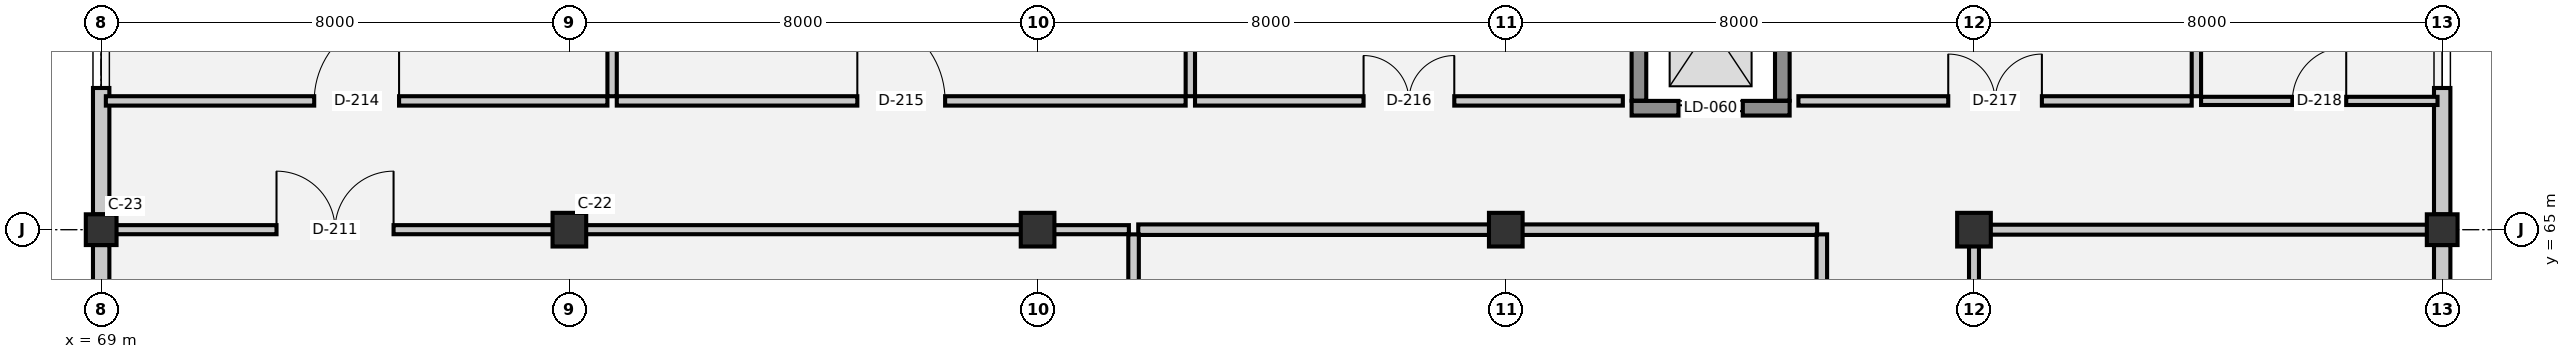
"""IFC4 building model, lengths in metres.
Left out: names, types, materials, properties, quantities, classifications, styles, units other than length and angle.
Written with IfcOpenShell. Run it as: python <this file> out.ifc"""

import sys

from ifc_helpers import new_model, si_unit, direction, frame, frame_2d, origin, origin_2d, place, context, subcontext, project, spatial, rectangle, extrude, element, fill, save


model = new_model("IFC4")
c1 = context("Model", 3, precision=1e-05, world=origin(), true_north=direction((0.0, 1.0)))
c2 = subcontext(c1, "Body", "Model", "MODEL_VIEW")
j1 = project(units=[si_unit("LENGTHUNIT", "METRE"), si_unit("PLANEANGLEUNIT", "RADIAN")], contexts=[c1])
p1 = place(None, origin())
s1 = spatial("IfcSite", under=j1, at=p1, CompositionType="ELEMENT")
p2 = place(p1, origin())
s2 = spatial("IfcBuilding", under=s1, at=p2, CompositionType="ELEMENT")
p3 = place(p2, frame((0.0, 0.0, 37.05)))
s3 = spatial("IfcBuildingStorey", under=s2, at=p3, CompositionType="ELEMENT", Elevation=37.05)
p4 = place(p3, frame((69.0, 65.0, 0.0), z_axis=(0.0, 0.0, 1.0), x_axis=(1.0, 0.0, 0.0)))
e1 = element("IfcColumn", 1, at=p4, inside=s3, PredefinedType="COLUMN", context=c2, shape_type="SweptSolid", body=[
    extrude(rectangle(XDim=0.525, YDim=0.525, at=origin_2d()), origin(), (0.0, 0.0, 1.0), 3.75),
])
for number, where, z_axis, x_axis in (
    (2, (77.0, 65.0, 0.0), (0.0, 0.0, 1.0), (1.0, 0.0, 0.0)),
    (3, (85.0, 65.0, 0.0), (0.0, 0.0, 1.0), (1.0, 0.0, 0.0)),
    (4, (93.0, 65.0, 0.0), (0.0, 0.0, 1.0), (1.0, 0.0, 0.0)),
    (5, (101.0, 65.0, 0.0), (0.0, 0.0, 1.0), (1.0, 0.0, 0.0)),
):
    element("IfcColumn", number, at=place(p3, frame(where, z_axis=z_axis, x_axis=x_axis)), inside=s3, PredefinedType="COLUMN", context=c2, shape_type="SweptSolid", body=[
        extrude(rectangle(XDim=0.575, YDim=0.575, at=origin_2d()), origin(), (0.0, 0.0, 1.0), 3.75),
    ])
p5 = place(p3, frame((109.0, 65.0, 0.0), z_axis=(0.0, 0.0, 1.0), x_axis=(1.0, 0.0, 0.0)))
e6 = element("IfcColumn", 6, at=p5, inside=s3, PredefinedType="COLUMN", context=c2, shape_type="SweptSolid", body=[
    extrude(rectangle(XDim=0.525, YDim=0.525, at=origin_2d()), origin(), (0.0, 0.0, 1.0), 3.75),
])
p6 = place(p3, frame((69.0, 51.262, 0.0), z_axis=(0.0, 0.0, 1.0), x_axis=(0.0, 1.0, 0.0)))
e7 = element("IfcWall", 7, at=p6, inside=s3, PredefinedType="SOLIDWALL", context=c2, shape_type="SweptSolid", body=[
    extrude(rectangle(XDim=13.475, YDim=0.28, at=frame_2d((6.738, 0.0))), origin(), (0.0, 0.0, 1.0), 2.6),
])
p7 = place(p6, frame((5.438, 0.0, 1.0)))
e8 = element("IfcOpeningElement", 8, at=p7, cuts=e7, PredefinedType="OPENING", context=c2, shape_type="SweptSolid", body=[
    extrude(rectangle(XDim=2.6, YDim=1.1, at=frame_2d((1.3, 0.55))), frame((0.0, 0.15, 0.0), z_axis=(0.0, -1.0, 0.0), x_axis=(1.0, 0.0, 0.0)), (0.0, 0.0, 1.0), 0.3),
])
p8 = place(p3, frame((69.0, 65.262, 0.0), z_axis=(0.0, 0.0, 1.0), x_axis=(0.0, 1.0, 0.0)))
e9 = element("IfcWall", 9, at=p8, inside=s3, PredefinedType="SOLIDWALL", context=c2, shape_type="SweptSolid", body=[
    extrude(rectangle(XDim=6.475, YDim=0.28, at=frame_2d((3.238, 0.0))), origin(), (0.0, 0.0, 1.0), 2.6),
])
p9 = place(p8, frame((2.158, 0.0, 1.0)))
e10 = element("IfcOpeningElement", 10, at=p9, cuts=e9, PredefinedType="OPENING", context=c2, shape_type="SweptSolid", body=[
    extrude(rectangle(XDim=2.6, YDim=1.1, at=frame_2d((1.3, 0.55))), frame((0.0, 0.15, 0.0), z_axis=(0.0, -1.0, 0.0), x_axis=(1.0, 0.0, 0.0)), (0.0, 0.0, 1.0), 0.3),
])
p10 = place(p3, frame((109.0, 71.738, 0.0), z_axis=(0.0, 0.0, 1.0), x_axis=(0.0, -1.0, 0.0)))
e11 = element("IfcWall", 11, at=p10, inside=s3, PredefinedType="SOLIDWALL", context=c2, shape_type="SweptSolid", body=[
    extrude(rectangle(XDim=6.475, YDim=0.28, at=frame_2d((3.238, 0.0))), origin(), (0.0, 0.0, 1.0), 2.6),
])
p11 = place(p10, frame((1.717, 0.0, 1.0)))
e12 = element("IfcOpeningElement", 12, at=p11, cuts=e11, PredefinedType="OPENING", context=c2, shape_type="SweptSolid", body=[
    extrude(rectangle(XDim=2.6, YDim=1.1, at=frame_2d((1.3, 0.55))), frame((0.0, 0.15, 0.0), z_axis=(0.0, -1.0, 0.0), x_axis=(1.0, 0.0, 0.0)), (0.0, 0.0, 1.0), 0.3),
])
p12 = place(p3, frame((109.0, 64.738, 0.0), z_axis=(0.0, 0.0, 1.0), x_axis=(0.0, -1.0, 0.0)))
e13 = element("IfcWall", 13, at=p12, inside=s3, PredefinedType="SOLIDWALL", context=c2, shape_type="SweptSolid", body=[
    extrude(rectangle(XDim=13.475, YDim=0.28, at=frame_2d((6.738, 0.0))), origin(), (0.0, 0.0, 1.0), 2.6),
])
p13 = place(p12, frame((5.438, 0.0, 1.0)))
e14 = element("IfcOpeningElement", 14, at=p13, cuts=e13, PredefinedType="OPENING", context=c2, shape_type="SweptSolid", body=[
    extrude(rectangle(XDim=2.6, YDim=1.1, at=frame_2d((1.3, 0.55))), frame((0.0, 0.15, 0.0), z_axis=(0.0, -1.0, 0.0), x_axis=(1.0, 0.0, 0.0)), (0.0, 0.0, 1.0), 0.3),
])
p14 = place(p3, frame((95.15, 67.075, 0.0), z_axis=(0.0, 0.0, 1.0), x_axis=(1.0, 0.0, 0.0)))
e15 = element("IfcWall", 15, at=p14, inside=s3, PredefinedType="SHEAR", context=c2, shape_type="SweptSolid", body=[
    extrude(rectangle(XDim=2.7, YDim=0.25, at=frame_2d((1.35, 0.0))), origin(), (0.0, 0.0, 1.0), 3.47),
])
p15 = place(p14, frame((0.8, 0.0, 0.0)))
e16 = element("IfcOpeningElement", 16, at=p15, cuts=e15, PredefinedType="OPENING", context=c2, shape_type="SweptSolid", body=[
    extrude(rectangle(XDim=1.1, YDim=2.15, at=frame_2d((0.55, 1.075))), frame((0.0, 0.135, 0.0), z_axis=(0.0, -1.0, 0.0), x_axis=(1.0, 0.0, 0.0)), (0.0, 0.0, 1.0), 0.27),
])
for number, where, z_axis, x_axis in (
    (17, (95.275, 69.795, 0.0), (0.0, 0.0, 1.0), (0.0, -1.0, 0.0)),
    (18, (97.725, 67.205, 0.0), (0.0, 0.0, 1.0), (0.0, 1.0, 0.0)),
):
    element("IfcWall", number, at=place(p3, frame(where, z_axis=z_axis, x_axis=x_axis)), inside=s3, PredefinedType="SHEAR", context=c2, shape_type="SweptSolid", body=[
        extrude(rectangle(XDim=2.59, YDim=0.25, at=frame_2d((1.295, 0.0))), origin(), (0.0, 0.0, 1.0), 3.47),
    ])
p16 = place(p3, frame((69.08, 65.0, 0.0), z_axis=(0.0, 0.0, 1.0), x_axis=(1.0, 0.0, 0.0)))
e19 = element("IfcWall", 19, at=p16, inside=s3, PredefinedType="PARTITIONING", context=c2, shape_type="SweptSolid", body=[
    extrude(rectangle(XDim=17.48, YDim=0.155, at=frame_2d((8.74, 0.0))), origin(), (0.0, 0.0, 1.0), 2.82),
])
p17 = place(p16, frame((2.916, 0.0, 0.0)))
e20 = element("IfcOpeningElement", 20, at=p17, cuts=e19, PredefinedType="OPENING", context=c2, shape_type="SweptSolid", body=[
    extrude(rectangle(XDim=2.0, YDim=2.35, at=frame_2d((1.0, 1.175))), frame((0.0, 0.087, 0.0), z_axis=(0.0, -1.0, 0.0), x_axis=(1.0, 0.0, 0.0)), (0.0, 0.0, 1.0), 0.175),
])
p18 = place(p3, frame((86.72, 65.0, 0.0), z_axis=(0.0, 0.0, 1.0), x_axis=(1.0, 0.0, 0.0)))
e21 = element("IfcWall", 21, at=p18, inside=s3, PredefinedType="PARTITIONING", context=c2, shape_type="SweptSolid", body=[
    extrude(rectangle(XDim=11.6, YDim=0.18, at=frame_2d((5.8, 0.0))), origin(), (0.0, 0.0, 1.0), 2.82),
])
p19 = place(p3, frame((101.08, 65.0, 0.0), z_axis=(0.0, 0.0, 1.0), x_axis=(1.0, 0.0, 0.0)))
e22 = element("IfcWall", 22, at=p19, inside=s3, PredefinedType="PARTITIONING", context=c2, shape_type="SweptSolid", body=[
    extrude(rectangle(XDim=7.84, YDim=0.17, at=frame_2d((3.92, 0.0))), origin(), (0.0, 0.0, 1.0), 2.82),
])
p20 = place(p3, frame((69.08, 67.2, 0.0), z_axis=(0.0, 0.0, 1.0), x_axis=(1.0, 0.0, 0.0)))
e23 = element("IfcWall", 23, at=p20, inside=s3, PredefinedType="PARTITIONING", context=c2, shape_type="SweptSolid", body=[
    extrude(rectangle(XDim=8.57, YDim=0.16, at=frame_2d((4.285, 0.0))), origin(), (0.0, 0.0, 1.0), 3.39),
])
p21 = place(p20, frame((3.56, 0.0, 0.0)))
e24 = element("IfcOpeningElement", 24, at=p21, cuts=e23, PredefinedType="OPENING", context=c2, shape_type="SweptSolid", body=[
    extrude(rectangle(XDim=1.45, YDim=2.25, at=frame_2d((0.725, 1.125))), frame((0.0, 0.09, 0.0), z_axis=(0.0, -1.0, 0.0), x_axis=(1.0, 0.0, 0.0)), (0.0, 0.0, 1.0), 0.18),
])
p22 = place(p3, frame((77.81, 67.2, 0.0), z_axis=(0.0, 0.0, 1.0), x_axis=(1.0, 0.0, 0.0)))
e25 = element("IfcWall", 25, at=p22, inside=s3, PredefinedType="PARTITIONING", context=c2, shape_type="SweptSolid", body=[
    extrude(rectangle(XDim=9.72, YDim=0.16, at=frame_2d((4.86, 0.0))), origin(), (0.0, 0.0, 1.0), 3.39),
])
p23 = place(p22, frame((4.11, 0.0, 0.0)))
e26 = element("IfcOpeningElement", 26, at=p23, cuts=e25, PredefinedType="OPENING", context=c2, shape_type="SweptSolid", body=[
    extrude(rectangle(XDim=1.5, YDim=2.25, at=frame_2d((0.75, 1.125))), frame((0.0, 0.09, 0.0), z_axis=(0.0, -1.0, 0.0), x_axis=(1.0, 0.0, 0.0)), (0.0, 0.0, 1.0), 0.18),
])
p24 = place(p3, frame((87.69, 67.2, 0.0), z_axis=(0.0, 0.0, 1.0), x_axis=(1.0, 0.0, 0.0)))
e27 = element("IfcWall", 27, at=p24, inside=s3, PredefinedType="PARTITIONING", context=c2, shape_type="SweptSolid", body=[
    extrude(rectangle(XDim=7.31, YDim=0.16, at=frame_2d((3.655, 0.0))), origin(), (0.0, 0.0, 1.0), 3.39),
])
p25 = place(p24, frame((2.88, 0.0, 0.0)))
e28 = element("IfcOpeningElement", 28, at=p25, cuts=e27, PredefinedType="OPENING", context=c2, shape_type="SweptSolid", body=[
    extrude(rectangle(XDim=1.55, YDim=2.25, at=frame_2d((0.775, 1.125))), frame((0.0, 0.09, 0.0), z_axis=(0.0, -1.0, 0.0), x_axis=(1.0, 0.0, 0.0)), (0.0, 0.0, 1.0), 0.18),
])
p26 = place(p3, frame((98.0, 67.2, 0.0), z_axis=(0.0, 0.0, 1.0), x_axis=(1.0, 0.0, 0.0)))
e29 = element("IfcWall", 29, at=p26, inside=s3, PredefinedType="PARTITIONING", context=c2, shape_type="SweptSolid", body=[
    extrude(rectangle(XDim=6.72, YDim=0.16, at=frame_2d((3.36, 0.0))), origin(), (0.0, 0.0, 1.0), 3.39),
])
p27 = place(p26, frame((2.56, 0.0, 0.0)))
e30 = element("IfcOpeningElement", 30, at=p27, cuts=e29, PredefinedType="OPENING", context=c2, shape_type="SweptSolid", body=[
    extrude(rectangle(XDim=1.6, YDim=2.25, at=frame_2d((0.8, 1.125))), frame((0.0, 0.09, 0.0), z_axis=(0.0, -1.0, 0.0), x_axis=(1.0, 0.0, 0.0)), (0.0, 0.0, 1.0), 0.18),
])
p28 = place(p3, frame((104.88, 67.2, 0.0), z_axis=(0.0, 0.0, 1.0), x_axis=(1.0, 0.0, 0.0)))
e31 = element("IfcWall", 31, at=p28, inside=s3, PredefinedType="PLUMBINGWALL", context=c2, shape_type="SweptSolid", body=[
    extrude(rectangle(XDim=4.04, YDim=0.14, at=frame_2d((2.02, 0.0))), origin(), (0.0, 0.0, 1.0), 3.39),
])
p29 = place(p28, frame((1.56, 0.0, 0.0)))
e32 = element("IfcOpeningElement", 32, at=p29, cuts=e31, PredefinedType="OPENING", context=c2, shape_type="SweptSolid", body=[
    extrude(rectangle(XDim=0.92, YDim=2.1, at=frame_2d((0.46, 1.05))), frame((0.0, 0.08, 0.0), z_axis=(0.0, -1.0, 0.0), x_axis=(1.0, 0.0, 0.0)), (0.0, 0.0, 1.0), 0.16),
])
p30 = place(p3, frame((77.73, 67.28, 0.0), z_axis=(0.0, 0.0, 1.0), x_axis=(0.0, 1.0, 0.0)))
e33 = element("IfcWall", 33, at=p30, inside=s3, PredefinedType="PARTITIONING", context=c2, shape_type="SweptSolid", body=[
    extrude(rectangle(XDim=4.64, YDim=0.16, at=frame_2d((2.32, 0.0))), origin(), (0.0, 0.0, 1.0), 3.39),
])
p31 = place(p3, frame((86.64, 51.08, 0.0), z_axis=(0.0, 0.0, 1.0), x_axis=(0.0, 1.0, 0.0)))
e34 = element("IfcWall", 34, at=p31, inside=s3, PredefinedType="PARTITIONING", context=c2, shape_type="SweptSolid", body=[
    extrude(rectangle(XDim=13.84, YDim=0.18, at=frame_2d((6.92, 0.0))), origin(), (0.0, 0.0, 1.0), 3.39),
])
p32 = place(p3, frame((87.61, 67.28, 0.0), z_axis=(0.0, 0.0, 1.0), x_axis=(0.0, 1.0, 0.0)))
e35 = element("IfcWall", 35, at=p32, inside=s3, PredefinedType="PARTITIONING", context=c2, shape_type="SweptSolid", body=[
    extrude(rectangle(XDim=4.64, YDim=0.16, at=frame_2d((2.32, 0.0))), origin(), (0.0, 0.0, 1.0), 3.39),
])
p33 = place(p3, frame((98.4, 51.08, 0.0), z_axis=(0.0, 0.0, 1.0), x_axis=(0.0, 1.0, 0.0)))
e36 = element("IfcWall", 36, at=p33, inside=s3, PredefinedType="PARTITIONING", context=c2, shape_type="SweptSolid", body=[
    extrude(rectangle(XDim=13.84, YDim=0.18, at=frame_2d((6.92, 0.0))), origin(), (0.0, 0.0, 1.0), 3.39),
])
p34 = place(p33, frame((6.345, 0.0, 0.0)))
e37 = element("IfcOpeningElement", 37, at=p34, cuts=e36, PredefinedType="OPENING", context=c2, shape_type="SweptSolid", body=[
    extrude(rectangle(XDim=1.15, YDim=2.2, at=frame_2d((0.575, 1.1))), frame((0.0, 0.1, 0.0), z_axis=(0.0, -1.0, 0.0), x_axis=(1.0, 0.0, 0.0)), (0.0, 0.0, 1.0), 0.2),
])
p35 = place(p3, frame((101.0, 51.08, 0.0), z_axis=(0.0, 0.0, 1.0), x_axis=(0.0, 1.0, 0.0)))
e38 = element("IfcWall", 38, at=p35, inside=s3, PredefinedType="PARTITIONING", context=c2, shape_type="SweptSolid", body=[
    extrude(rectangle(XDim=13.84, YDim=0.17, at=frame_2d((6.92, 0.0))), origin(), (0.0, 0.0, 1.0), 2.62),
])
p36 = place(p35, frame((6.02, 0.0, 0.0)))
e39 = element("IfcOpeningElement", 39, at=p36, cuts=e38, PredefinedType="OPENING", context=c2, shape_type="SweptSolid", body=[
    extrude(rectangle(XDim=1.8, YDim=2.3, at=frame_2d((0.9, 1.15))), frame((0.0, 0.095, 0.0), z_axis=(0.0, -1.0, 0.0), x_axis=(1.0, 0.0, 0.0)), (0.0, 0.0, 1.0), 0.19),
])
p37 = place(p3, frame((104.8, 67.28, 0.0), z_axis=(0.0, 0.0, 1.0), x_axis=(0.0, 1.0, 0.0)))
e40 = element("IfcWall", 40, at=p37, inside=s3, PredefinedType="PARTITIONING", context=c2, shape_type="SweptSolid", body=[
    extrude(rectangle(XDim=4.64, YDim=0.16, at=frame_2d((2.32, 0.0))), origin(), (0.0, 0.0, 1.0), 3.39),
])
p38 = place(p9, origin())
e41 = element("IfcWindow", 41, at=p38, inside=s3, PartitioningType="SINGLE_PANEL", PredefinedType="WINDOW", context=c2, shape_type="SweptSolid", body=[
    extrude(rectangle(XDim=2.6, YDim=1.1, at=frame_2d((1.3, 0.55))), frame((0.0, 0.03, 0.0), z_axis=(0.0, -1.0, 0.0), x_axis=(1.0, 0.0, 0.0)), (0.0, 0.0, 1.0), 0.06),
])
fill(e10, e41)
p39 = place(p11, origin())
e42 = element("IfcWindow", 42, at=p39, inside=s3, PartitioningType="SINGLE_PANEL", PredefinedType="WINDOW", context=c2, shape_type="SweptSolid", body=[
    extrude(rectangle(XDim=2.6, YDim=1.1, at=frame_2d((1.3, 0.55))), frame((0.0, 0.03, 0.0), z_axis=(0.0, -1.0, 0.0), x_axis=(1.0, 0.0, 0.0)), (0.0, 0.0, 1.0), 0.06),
])
fill(e12, e42)
p40 = place(p15, origin())
e43 = element("IfcDoor", 43, at=p40, inside=s3, OperationType="DOUBLE_DOOR_SLIDING", PredefinedType="DOOR", context=c2, shape_type="SweptSolid", body=[
    extrude(rectangle(XDim=1.1, YDim=2.15, at=frame_2d((0.55, 1.075))), frame((0.0, 0.025, 0.0), z_axis=(0.0, -1.0, 0.0), x_axis=(1.0, 0.0, 0.0)), (0.0, 0.0, 1.0), 0.05),
])
fill(e16, e43)
p41 = place(p17, origin())
e44 = element("IfcDoor", 44, at=p41, inside=s3, OperationType="DOUBLE_DOOR_SINGLE_SWING", PredefinedType="DOOR", context=c2, shape_type="SweptSolid", body=[
    extrude(rectangle(XDim=2.0, YDim=2.35, at=frame_2d((1.0, 1.175))), frame((0.0, 0.025, 0.0), z_axis=(0.0, -1.0, 0.0), x_axis=(1.0, 0.0, 0.0)), (0.0, 0.0, 1.0), 0.05),
])
fill(e20, e44)
p42 = place(p21, origin())
e45 = element("IfcDoor", 45, at=p42, inside=s3, OperationType="SINGLE_SWING_RIGHT", PredefinedType="DOOR", context=c2, shape_type="SweptSolid", body=[
    extrude(rectangle(XDim=1.45, YDim=2.25, at=frame_2d((0.725, 1.125))), frame((0.0, 0.025, 0.0), z_axis=(0.0, -1.0, 0.0), x_axis=(1.0, 0.0, 0.0)), (0.0, 0.0, 1.0), 0.05),
])
fill(e24, e45)
p43 = place(p23, origin())
e46 = element("IfcDoor", 46, at=p43, inside=s3, OperationType="SINGLE_SWING_LEFT", PredefinedType="DOOR", context=c2, shape_type="SweptSolid", body=[
    extrude(rectangle(XDim=1.5, YDim=2.25, at=frame_2d((0.75, 1.125))), frame((0.0, 0.025, 0.0), z_axis=(0.0, -1.0, 0.0), x_axis=(1.0, 0.0, 0.0)), (0.0, 0.0, 1.0), 0.05),
])
fill(e26, e46)
p44 = place(p25, origin())
e47 = element("IfcDoor", 47, at=p44, inside=s3, OperationType="DOUBLE_DOOR_SINGLE_SWING", PredefinedType="DOOR", context=c2, shape_type="SweptSolid", body=[
    extrude(rectangle(XDim=1.55, YDim=2.25, at=frame_2d((0.775, 1.125))), frame((0.0, 0.025, 0.0), z_axis=(0.0, -1.0, 0.0), x_axis=(1.0, 0.0, 0.0)), (0.0, 0.0, 1.0), 0.05),
])
fill(e28, e47)
p45 = place(p27, origin())
e48 = element("IfcDoor", 48, at=p45, inside=s3, OperationType="DOUBLE_DOOR_SINGLE_SWING", PredefinedType="DOOR", context=c2, shape_type="SweptSolid", body=[
    extrude(rectangle(XDim=1.6, YDim=2.25, at=frame_2d((0.8, 1.125))), frame((0.0, 0.025, 0.0), z_axis=(0.0, -1.0, 0.0), x_axis=(1.0, 0.0, 0.0)), (0.0, 0.0, 1.0), 0.05),
])
fill(e30, e48)
p46 = place(p29, origin())
e49 = element("IfcDoor", 49, at=p46, inside=s3, OperationType="SINGLE_SWING_RIGHT", PredefinedType="DOOR", context=c2, shape_type="SweptSolid", body=[
    extrude(rectangle(XDim=0.92, YDim=2.1, at=frame_2d((0.46, 1.05))), frame((0.0, 0.025, 0.0), z_axis=(0.0, -1.0, 0.0), x_axis=(1.0, 0.0, 0.0)), (0.0, 0.0, 1.0), 0.05),
])
fill(e32, e49)
save(model, sys.argv[1])
